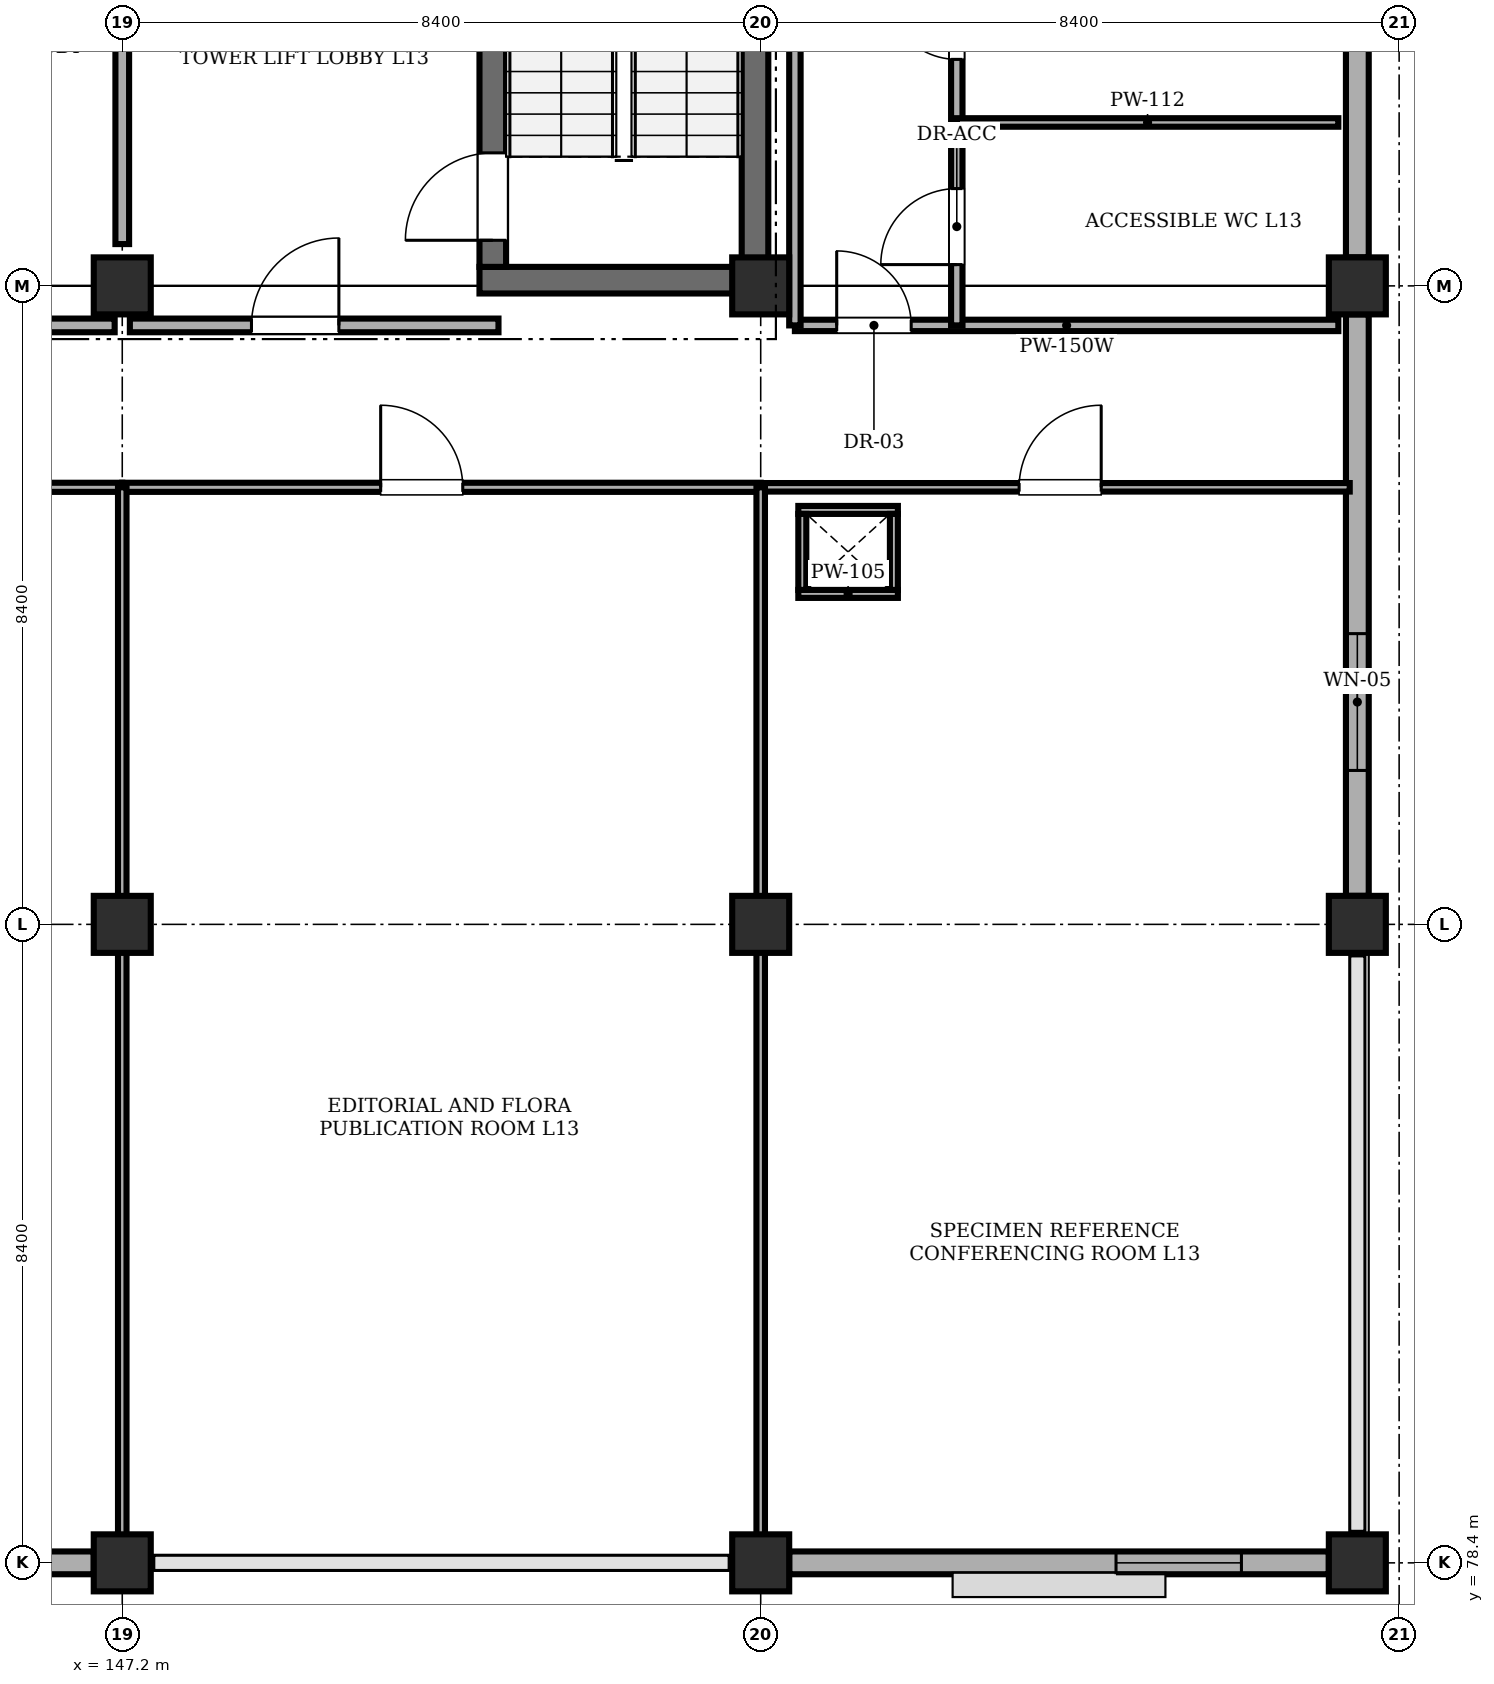
"""IFC4 building model, lengths in metres.
Left out: names, types, materials, properties, quantities, classifications, styles, units other than length and angle.
Written with IfcOpenShell. Run it as: python <this file> out.ifc"""

import sys

from ifc_helpers import new_model, si_unit, direction, frame, frame_2d, origin, origin_2d, place, context, subcontext, project, spatial, rectangle, extrude, element, fill, save


model = new_model("IFC4")
c1 = context("Model", 3, precision=1e-05, world=origin(), true_north=direction((0.0, 1.0)))
c2 = subcontext(c1, "Body", "Model", "MODEL_VIEW")
j1 = project(units=[si_unit("LENGTHUNIT", "METRE"), si_unit("PLANEANGLEUNIT", "RADIAN")], contexts=[c1])
p1 = place(None, origin())
s1 = spatial("IfcSite", under=j1, at=p1, CompositionType="ELEMENT")
p2 = place(p1, origin())
s2 = spatial("IfcBuilding", under=s1, at=p2, CompositionType="ELEMENT")
p3 = place(p2, frame((0.0, 0.0, 52.8)))
s3 = spatial("IfcBuildingStorey", under=s2, at=p3, CompositionType="ELEMENT", Elevation=52.8)
for number, where, z_axis, x_axis in (
    (1, (147.2, 78.4, 0.0), (0.0, 0.0, 1.0), (1.0, 0.0, 0.0)),
    (2, (147.2, 86.8, 0.0), (0.0, 0.0, 1.0), (1.0, 0.0, 0.0)),
    (3, (147.2, 95.2, 0.0), (0.0, 0.0, 1.0), (1.0, 0.0, 0.0)),
    (4, (155.6, 78.4, 0.0), (0.0, 0.0, 1.0), (1.0, 0.0, 0.0)),
    (5, (155.6, 86.8, 0.0), (0.0, 0.0, 1.0), (1.0, 0.0, 0.0)),
    (6, (155.6, 95.2, 0.0), (0.0, 0.0, 1.0), (1.0, 0.0, 0.0)),
    (7, (163.45, 78.4, 0.0), (0.0, 0.0, 1.0), (1.0, 0.0, 0.0)),
    (8, (163.45, 86.8, 0.0), (0.0, 0.0, 1.0), (1.0, 0.0, 0.0)),
    (9, (163.45, 95.2, 0.0), (0.0, 0.0, 1.0), (1.0, 0.0, 0.0)),
):
    element("IfcColumn", number, at=place(p3, frame(where, z_axis=z_axis, x_axis=x_axis)), inside=s3, PredefinedType="COLUMN", context=c2, shape_type="SweptSolid", body=[
        extrude(rectangle(XDim=0.75, YDim=0.75, at=origin_2d()), origin(), (0.0, 0.0, 1.0), 4.03),
    ])
p4 = place(p3, frame((151.9, 95.275, 0.0), z_axis=(0.0, 0.0, 1.0), x_axis=(1.0, 0.0, 0.0)))
e10 = element("IfcWall", 10, at=p4, inside=s3, PredefinedType="SHEAR", context=c2, shape_type="SweptSolid", body=[
    extrude(rectangle(XDim=3.8, YDim=0.35, at=frame_2d((1.9, 0.0))), origin(), (0.0, 0.0, 1.0), 4.03),
])
p5 = place(p3, frame((152.075, 95.45, 0.0), z_axis=(0.0, 0.0, 1.0), x_axis=(0.0, 1.0, 0.0)))
e11 = element("IfcWall", 11, at=p5, inside=s3, PredefinedType="SHEAR", context=c2, shape_type="SweptSolid", body=[
    extrude(rectangle(XDim=7.9, YDim=0.35, at=frame_2d((3.95, 0.0))), origin(), (0.0, 0.0, 1.0), 4.03),
])
p6 = place(p5, frame((0.35, 0.0, 0.0)))
e12 = element("IfcOpeningElement", 12, at=p6, cuts=e11, PredefinedType="OPENING", context=c2, shape_type="SweptSolid", body=[
    extrude(rectangle(XDim=1.15, YDim=2.15, at=frame_2d((0.575, 1.075))), frame((0.0, 0.185, 0.0), z_axis=(0.0, -1.0, 0.0), x_axis=(1.0, 0.0, 0.0)), (0.0, 0.0, 1.0), 0.37),
])
p7 = place(p3, frame((155.525, 95.45, 0.0), z_axis=(0.0, 0.0, 1.0), x_axis=(0.0, 1.0, 0.0)))
e13 = element("IfcWall", 13, at=p7, inside=s3, PredefinedType="SHEAR", context=c2, shape_type="SweptSolid", body=[
    extrude(rectangle(XDim=7.9, YDim=0.35, at=frame_2d((3.95, 0.0))), origin(), (0.0, 0.0, 1.0), 4.03),
])
p8 = place(p3, frame((146.825, 78.4, 0.0), z_axis=(0.0, 0.0, 1.0), x_axis=(-1.0, 0.0, 0.0)))
e14 = element("IfcWall", 14, at=p8, inside=s3, PredefinedType="STANDARD", context=c2, shape_type="SweptSolid", body=[
    extrude(rectangle(XDim=7.65, YDim=0.3, at=frame_2d((3.825, 0.0))), origin(), (0.0, 0.0, 1.0), 3.33),
])
p9 = place(p8, frame((1.15, 0.0, 0.95)))
e15 = element("IfcOpeningElement", 15, at=p9, cuts=e14, PredefinedType="OPENING", context=c2, shape_type="SweptSolid", body=[
    extrude(rectangle(XDim=1.65, YDim=1.85, at=frame_2d((0.825, 0.925))), frame((0.0, 0.16, 0.0), z_axis=(0.0, -1.0, 0.0), x_axis=(1.0, 0.0, 0.0)), (0.0, 0.0, 1.0), 0.32),
])
p10 = place(p3, frame((163.075, 78.4, 0.0), z_axis=(0.0, 0.0, 1.0), x_axis=(-1.0, 0.0, 0.0)))
e16 = element("IfcWall", 16, at=p10, inside=s3, PredefinedType="STANDARD", context=c2, shape_type="SweptSolid", body=[
    extrude(rectangle(XDim=7.1, YDim=0.3, at=frame_2d((3.55, 0.0))), origin(), (0.0, 0.0, 1.0), 3.33),
])
p11 = place(p10, frame((1.15, 0.0, 0.95)))
e17 = element("IfcOpeningElement", 17, at=p11, cuts=e16, PredefinedType="OPENING", context=c2, shape_type="SweptSolid", body=[
    extrude(rectangle(XDim=1.65, YDim=1.85, at=frame_2d((0.825, 0.925))), frame((0.0, 0.16, 0.0), z_axis=(0.0, -1.0, 0.0), x_axis=(1.0, 0.0, 0.0)), (0.0, 0.0, 1.0), 0.32),
])
p12 = place(p3, frame((163.45, 94.825, 0.0), z_axis=(0.0, 0.0, 1.0), x_axis=(0.0, -1.0, 0.0)))
e18 = element("IfcWall", 18, at=p12, inside=s3, PredefinedType="STANDARD", context=c2, shape_type="SweptSolid", body=[
    extrude(rectangle(XDim=7.65, YDim=0.3, at=frame_2d((3.825, 0.0))), origin(), (0.0, 0.0, 1.0), 3.33),
])
p13 = place(p12, frame((4.2, 0.0, 1.1)))
e19 = element("IfcOpeningElement", 19, at=p13, cuts=e18, PredefinedType="OPENING", context=c2, shape_type="SweptSolid", body=[
    extrude(rectangle(XDim=1.8, YDim=1.8, at=frame_2d((0.9, 0.9))), frame((0.0, 0.16, 0.0), z_axis=(0.0, -1.0, 0.0), x_axis=(1.0, 0.0, 0.0)), (0.0, 0.0, 1.0), 0.32),
])
p14 = place(p3, frame((163.45, 103.225, 0.0), z_axis=(0.0, 0.0, 1.0), x_axis=(0.0, -1.0, 0.0)))
e20 = element("IfcWall", 20, at=p14, inside=s3, PredefinedType="STANDARD", context=c2, shape_type="SweptSolid", body=[
    extrude(rectangle(XDim=7.65, YDim=0.3, at=frame_2d((3.825, 0.0))), origin(), (0.0, 0.0, 1.0), 3.33),
])
p15 = place(p14, frame((1.15, 0.0, 1.1)))
e21 = element("IfcOpeningElement", 21, at=p15, cuts=e20, PredefinedType="OPENING", context=c2, shape_type="SweptSolid", body=[
    extrude(rectangle(XDim=1.4, YDim=1.4, at=frame_2d((0.7, 0.7))), frame((0.0, 0.16, 0.0), z_axis=(0.0, -1.0, 0.0), x_axis=(1.0, 0.0, 0.0)), (0.0, 0.0, 1.0), 0.32),
])
p16 = place(p3, frame((142.3, 94.68, 0.0), z_axis=(0.0, 0.0, 1.0), x_axis=(1.0, 0.0, 0.0)))
e22 = element("IfcWall", 22, at=p16, inside=s3, PredefinedType="STANDARD", context=c2, shape_type="SweptSolid", body=[
    extrude(rectangle(XDim=4.8, YDim=0.18, at=frame_2d((2.4, 0.0))), origin(), (0.0, 0.0, 1.0), 4.03),
])
p17 = place(p16, frame((1.6, 0.0, 0.0)))
e23 = element("IfcOpeningElement", 23, at=p17, cuts=e22, PredefinedType="OPENING", context=c2, shape_type="SweptSolid", body=[
    extrude(rectangle(XDim=1.15, YDim=2.15, at=frame_2d((0.575, 1.075))), frame((0.0, 0.1, 0.0), z_axis=(0.0, -1.0, 0.0), x_axis=(1.0, 0.0, 0.0)), (0.0, 0.0, 1.0), 0.2),
])
p18 = place(p3, frame((147.3, 94.68, 0.0), z_axis=(0.0, 0.0, 1.0), x_axis=(1.0, 0.0, 0.0)))
e24 = element("IfcWall", 24, at=p18, inside=s3, PredefinedType="STANDARD", context=c2, shape_type="SweptSolid", body=[
    extrude(rectangle(XDim=4.85, YDim=0.18, at=frame_2d((2.425, 0.0))), origin(), (0.0, 0.0, 1.0), 4.03),
])
p19 = place(p18, frame((1.6, 0.0, 0.0)))
e25 = element("IfcOpeningElement", 25, at=p19, cuts=e24, PredefinedType="OPENING", context=c2, shape_type="SweptSolid", body=[
    extrude(rectangle(XDim=1.15, YDim=2.15, at=frame_2d((0.575, 1.075))), frame((0.0, 0.1, 0.0), z_axis=(0.0, -1.0, 0.0), x_axis=(1.0, 0.0, 0.0)), (0.0, 0.0, 1.0), 0.2),
])
p20 = place(p3, frame((147.2, 95.75, 0.0), z_axis=(0.0, 0.0, 1.0), x_axis=(0.0, 1.0, 0.0)))
e26 = element("IfcWall", 26, at=p20, inside=s3, PredefinedType="STANDARD", context=c2, shape_type="SweptSolid", body=[
    extrude(rectangle(XDim=4.5, YDim=0.18, at=frame_2d((2.25, 0.0))), origin(), (0.0, 0.0, 1.0), 3.33),
])
p21 = place(p3, frame((156.05, 94.68, 0.0), z_axis=(0.0, 0.0, 1.0), x_axis=(1.0, 0.0, 0.0)))
e27 = element("IfcWall", 27, at=p21, inside=s3, PredefinedType="PARTITIONING", context=c2, shape_type="SweptSolid", body=[
    extrude(rectangle(XDim=7.15, YDim=0.15, at=frame_2d((3.575, 0.0))), origin(), (0.0, 0.0, 1.0), 4.03),
])
p22 = place(p21, frame((0.55, 0.0, 0.0)))
e28 = element("IfcOpeningElement", 28, at=p22, cuts=e27, PredefinedType="OPENING", context=c2, shape_type="SweptSolid", body=[
    extrude(rectangle(XDim=0.98, YDim=2.12, at=frame_2d((0.49, 1.06))), frame((0.0, 0.085, 0.0), z_axis=(0.0, -1.0, 0.0), x_axis=(1.0, 0.0, 0.0)), (0.0, 0.0, 1.0), 0.17),
])
p23 = place(p3, frame((158.18, 94.68, 0.0), z_axis=(0.0, 0.0, 1.0), x_axis=(0.0, 1.0, 0.0)))
e29 = element("IfcWall", 29, at=p23, inside=s3, PredefinedType="PARTITIONING", context=c2, shape_type="SweptSolid", body=[
    extrude(rectangle(XDim=8.57, YDim=0.15, at=frame_2d((4.285, 0.0))), origin(), (0.0, 0.0, 1.0), 4.03),
])
p24 = place(p23, frame((0.8, 0.0, 0.0)))
e30 = element("IfcOpeningElement", 30, at=p24, cuts=e29, PredefinedType="OPENING", context=c2, shape_type="SweptSolid", body=[
    extrude(rectangle(XDim=1.0, YDim=2.12, at=frame_2d((0.5, 1.06))), frame((0.0, 0.085, 0.0), z_axis=(0.0, -1.0, 0.0), x_axis=(1.0, 0.0, 0.0)), (0.0, 0.0, 1.0), 0.17),
])
p25 = place(p23, frame((3.5, 0.0, 0.0)))
e31 = element("IfcOpeningElement", 31, at=p25, cuts=e29, PredefinedType="OPENING", context=c2, shape_type="SweptSolid", body=[
    extrude(rectangle(XDim=0.92, YDim=2.1, at=frame_2d((0.46, 1.05))), frame((0.0, 0.085, 0.0), z_axis=(0.0, -1.0, 0.0), x_axis=(1.0, 0.0, 0.0)), (0.0, 0.0, 1.0), 0.17),
])
p26 = place(p23, frame((6.4, 0.0, 0.0)))
e32 = element("IfcOpeningElement", 32, at=p26, cuts=e29, PredefinedType="OPENING", context=c2, shape_type="SweptSolid", body=[
    extrude(rectangle(XDim=0.92, YDim=2.1, at=frame_2d((0.46, 1.05))), frame((0.0, 0.085, 0.0), z_axis=(0.0, -1.0, 0.0), x_axis=(1.0, 0.0, 0.0)), (0.0, 0.0, 1.0), 0.17),
])
p27 = place(p3, frame((158.18, 97.35, 0.0), z_axis=(0.0, 0.0, 1.0), x_axis=(1.0, 0.0, 0.0)))
e33 = element("IfcWall", 33, at=p27, inside=s3, PredefinedType="PARTITIONING", context=c2, shape_type="SweptSolid", body=[
    extrude(rectangle(XDim=5.02, YDim=0.112, at=frame_2d((2.51, 0.0))), origin(), (0.0, 0.0, 1.0), 4.03),
])
p28 = place(p3, frame((156.05, 94.68, 0.0), z_axis=(0.0, 0.0, 1.0), x_axis=(0.0, 1.0, 0.0)))
e34 = element("IfcWall", 34, at=p28, inside=s3, PredefinedType="PARTITIONING", context=c2, shape_type="SweptSolid", body=[
    extrude(rectangle(XDim=8.57, YDim=0.15, at=frame_2d((4.285, 0.0))), origin(), (0.0, 0.0, 1.0), 4.03),
])
p29 = place(p3, frame((138.95, 92.55, 0.0), z_axis=(0.0, 0.0, 1.0), x_axis=(1.0, 0.0, 0.0)))
e35 = element("IfcWall", 35, at=p29, inside=s3, PredefinedType="PARTITIONING", context=c2, shape_type="SweptSolid", body=[
    extrude(rectangle(XDim=8.25, YDim=0.12, at=frame_2d((4.125, 0.0))), origin(), (0.0, 0.0, 1.0), 4.03),
])
p30 = place(p29, frame((3.65, 0.0, 0.0)))
e36 = element("IfcOpeningElement", 36, at=p30, cuts=e35, PredefinedType="OPENING", context=c2, shape_type="SweptSolid", body=[
    extrude(rectangle(XDim=1.08, YDim=2.15, at=frame_2d((0.54, 1.075))), frame((0.0, 0.07, 0.0), z_axis=(0.0, -1.0, 0.0), x_axis=(1.0, 0.0, 0.0)), (0.0, 0.0, 1.0), 0.14),
])
p31 = place(p3, frame((147.2, 92.55, 0.0), z_axis=(0.0, 0.0, 1.0), x_axis=(1.0, 0.0, 0.0)))
e37 = element("IfcWall", 37, at=p31, inside=s3, PredefinedType="PARTITIONING", context=c2, shape_type="SweptSolid", body=[
    extrude(rectangle(XDim=8.4, YDim=0.12, at=frame_2d((4.2, 0.0))), origin(), (0.0, 0.0, 1.0), 4.03),
])
p32 = place(p31, frame((3.4, 0.0, 0.0)))
e38 = element("IfcOpeningElement", 38, at=p32, cuts=e37, PredefinedType="OPENING", context=c2, shape_type="SweptSolid", body=[
    extrude(rectangle(XDim=1.08, YDim=2.15, at=frame_2d((0.54, 1.075))), frame((0.0, 0.07, 0.0), z_axis=(0.0, -1.0, 0.0), x_axis=(1.0, 0.0, 0.0)), (0.0, 0.0, 1.0), 0.14),
])
p33 = place(p3, frame((147.2, 78.55, 0.0), z_axis=(0.0, 0.0, 1.0), x_axis=(0.0, 1.0, 0.0)))
e39 = element("IfcWall", 39, at=p33, inside=s3, PredefinedType="PARTITIONING", context=c2, shape_type="SweptSolid", body=[
    extrude(rectangle(XDim=14.0, YDim=0.112, at=frame_2d((7.0, 0.0))), origin(), (0.0, 0.0, 1.0), 3.33),
])
p34 = place(p3, frame((155.6, 92.55, 0.0), z_axis=(0.0, 0.0, 1.0), x_axis=(1.0, 0.0, 0.0)))
e40 = element("IfcWall", 40, at=p34, inside=s3, PredefinedType="PARTITIONING", context=c2, shape_type="SweptSolid", body=[
    extrude(rectangle(XDim=7.75, YDim=0.112, at=frame_2d((3.875, 0.0))), origin(), (0.0, 0.0, 1.0), 4.03),
])
p35 = place(p34, frame((3.4, 0.0, 0.0)))
e41 = element("IfcOpeningElement", 41, at=p35, cuts=e40, PredefinedType="OPENING", context=c2, shape_type="SweptSolid", body=[
    extrude(rectangle(XDim=1.08, YDim=2.15, at=frame_2d((0.54, 1.075))), frame((0.0, 0.066, 0.0), z_axis=(0.0, -1.0, 0.0), x_axis=(1.0, 0.0, 0.0)), (0.0, 0.0, 1.0), 0.132),
])
p36 = place(p3, frame((155.6, 78.55, 0.0), z_axis=(0.0, 0.0, 1.0), x_axis=(0.0, 1.0, 0.0)))
e42 = element("IfcWall", 42, at=p36, inside=s3, PredefinedType="PARTITIONING", context=c2, shape_type="SweptSolid", body=[
    extrude(rectangle(XDim=14.0, YDim=0.112, at=frame_2d((7.0, 0.0))), origin(), (0.0, 0.0, 1.0), 3.33),
])
for number, where, z_axis, x_axis in (
    (43, (156.095, 91.147, 0.0), (0.0, 0.0, 1.0), (1.0, 0.0, 0.0)),
    (44, (156.095, 92.252, 0.0), (0.0, 0.0, 1.0), (1.0, 0.0, 0.0)),
):
    element("IfcWall", number, at=place(p3, frame(where, z_axis=z_axis, x_axis=x_axis)), inside=s3, PredefinedType="PARTITIONING", context=c2, shape_type="SweptSolid", body=[
        extrude(rectangle(XDim=1.31, YDim=0.105, at=frame_2d((0.655, 0.0))), origin(), (0.0, 0.0, 1.0), 4.03),
    ])
for number, where, z_axis, x_axis in (
    (45, (156.147, 91.2, 0.0), (0.0, 0.0, 1.0), (0.0, 1.0, 0.0)),
    (46, (157.353, 91.2, 0.0), (0.0, 0.0, 1.0), (0.0, 1.0, 0.0)),
):
    element("IfcWall", number, at=place(p3, frame(where, z_axis=z_axis, x_axis=x_axis)), inside=s3, PredefinedType="PARTITIONING", context=c2, shape_type="SweptSolid", body=[
        extrude(rectangle(XDim=1.0, YDim=0.105, at=frame_2d((0.5, 0.0))), origin(), (0.0, 0.0, 1.0), 4.03),
    ])
p37 = place(p11, origin())
e47 = element("IfcWindow", 47, at=p37, inside=s3, PartitioningType="DOUBLE_PANEL_VERTICAL", PredefinedType="WINDOW", context=c2, shape_type="SweptSolid", body=[
    extrude(rectangle(XDim=1.65, YDim=1.85, at=frame_2d((0.825, 0.925))), frame((0.0, 0.03, 0.0), z_axis=(0.0, -1.0, 0.0), x_axis=(1.0, 0.0, 0.0)), (0.0, 0.0, 1.0), 0.06),
])
fill(e17, e47)
p38 = place(p13, origin())
e48 = element("IfcWindow", 48, at=p38, inside=s3, PartitioningType="DOUBLE_PANEL_VERTICAL", PredefinedType="WINDOW", context=c2, shape_type="SweptSolid", body=[
    extrude(rectangle(XDim=1.8, YDim=1.8, at=frame_2d((0.9, 0.9))), frame((0.0, 0.03, 0.0), z_axis=(0.0, -1.0, 0.0), x_axis=(1.0, 0.0, 0.0)), (0.0, 0.0, 1.0), 0.06),
])
fill(e19, e48)
p39 = place(p19, origin())
e49 = element("IfcDoor", 49, at=p39, inside=s3, OperationType="SINGLE_SWING_RIGHT", PredefinedType="DOOR", context=c2, shape_type="SweptSolid", body=[
    extrude(rectangle(XDim=1.15, YDim=2.15, at=frame_2d((0.575, 1.075))), frame((0.0, 0.025, 0.0), z_axis=(0.0, -1.0, 0.0), x_axis=(1.0, 0.0, 0.0)), (0.0, 0.0, 1.0), 0.05),
])
fill(e25, e49)
p40 = place(p22, origin())
e50 = element("IfcDoor", 50, at=p40, inside=s3, OperationType="SINGLE_SWING_LEFT", PredefinedType="DOOR", context=c2, shape_type="SweptSolid", body=[
    extrude(rectangle(XDim=0.98, YDim=2.12, at=frame_2d((0.49, 1.06))), frame((0.0, 0.025, 0.0), z_axis=(0.0, -1.0, 0.0), x_axis=(1.0, 0.0, 0.0)), (0.0, 0.0, 1.0), 0.05),
])
fill(e28, e50)
p41 = place(p24, origin())
e51 = element("IfcDoor", 51, at=p41, inside=s3, OperationType="SINGLE_SWING_LEFT", PredefinedType="DOOR", context=c2, shape_type="SweptSolid", body=[
    extrude(rectangle(XDim=1.0, YDim=2.12, at=frame_2d((0.5, 1.06))), frame((0.0, 0.025, 0.0), z_axis=(0.0, -1.0, 0.0), x_axis=(1.0, 0.0, 0.0)), (0.0, 0.0, 1.0), 0.05),
])
fill(e30, e51)
p42 = place(p25, origin())
e52 = element("IfcDoor", 52, at=p42, inside=s3, OperationType="SINGLE_SWING_RIGHT", PredefinedType="DOOR", context=c2, shape_type="SweptSolid", body=[
    extrude(rectangle(XDim=0.92, YDim=2.1, at=frame_2d((0.46, 1.05))), frame((0.0, 0.025, 0.0), z_axis=(0.0, -1.0, 0.0), x_axis=(1.0, 0.0, 0.0)), (0.0, 0.0, 1.0), 0.05),
])
fill(e31, e52)
p43 = place(p32, origin())
e53 = element("IfcDoor", 53, at=p43, inside=s3, OperationType="SINGLE_SWING_LEFT", PredefinedType="DOOR", context=c2, shape_type="SweptSolid", body=[
    extrude(rectangle(XDim=1.08, YDim=2.15, at=frame_2d((0.54, 1.075))), frame((0.0, 0.025, 0.0), z_axis=(0.0, -1.0, 0.0), x_axis=(1.0, 0.0, 0.0)), (0.0, 0.0, 1.0), 0.05),
])
fill(e38, e53)
p44 = place(p35, origin())
e54 = element("IfcDoor", 54, at=p44, inside=s3, OperationType="SINGLE_SWING_RIGHT", PredefinedType="DOOR", context=c2, shape_type="SweptSolid", body=[
    extrude(rectangle(XDim=1.08, YDim=2.15, at=frame_2d((0.54, 1.075))), frame((0.0, 0.025, 0.0), z_axis=(0.0, -1.0, 0.0), x_axis=(1.0, 0.0, 0.0)), (0.0, 0.0, 1.0), 0.05),
])
fill(e41, e54)
p45 = place(p6, origin())
e55 = element("IfcDoor", 55, at=p45, inside=s3, OperationType="SINGLE_SWING_LEFT", PredefinedType="DOOR", context=c2, shape_type="SweptSolid", body=[
    extrude(rectangle(XDim=1.15, YDim=2.15, at=frame_2d((0.575, 1.075))), frame((0.0, 0.025, 0.0), z_axis=(0.0, -1.0, 0.0), x_axis=(1.0, 0.0, 0.0)), (0.0, 0.0, 1.0), 0.05),
])
fill(e12, e55)
save(model, sys.argv[1])
